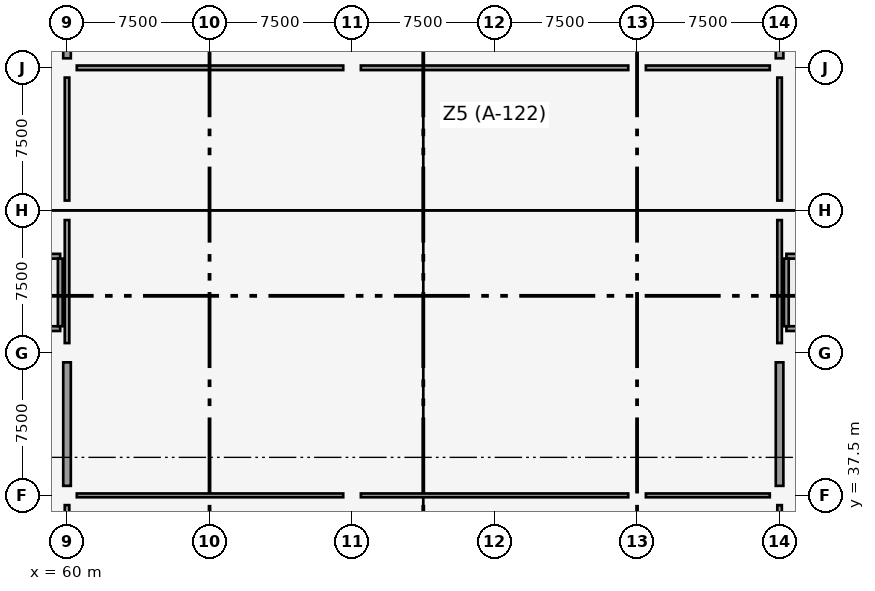
"""IFC4 building model, lengths in metres.
Left out: names, types, materials, properties, quantities, classifications, styles, units other than length and angle.
Written with IfcOpenShell. Run it as: python <this file> out.ifc"""

import sys

from ifc_helpers import new_model, si_unit, direction, frame, frame_2d, origin, origin_2d, place, context, subcontext, project, spatial, rectangle, extrude, element, fill, save


model = new_model("IFC4")
c1 = context("Model", 3, precision=1e-05, world=origin(), true_north=direction((0.0, 1.0)))
c2 = subcontext(c1, "Body", "Model", "MODEL_VIEW")
j1 = project(units=[si_unit("LENGTHUNIT", "METRE"), si_unit("PLANEANGLEUNIT", "RADIAN")], contexts=[c1])
p1 = place(None, origin())
s1 = spatial("IfcSite", under=j1, at=p1, CompositionType="ELEMENT")
p2 = place(p1, origin())
s2 = spatial("IfcBuilding", under=s1, at=p2, CompositionType="ELEMENT")
p3 = place(p2, origin())
s3 = spatial("IfcBuildingStorey", under=s2, at=p3, CompositionType="ELEMENT", Elevation=0.0)
for number, where, z_axis, x_axis in (
    (1, (60.0, 37.5, 0.0), (0.0, 0.0, 1.0), (1.0, 0.0, 0.0)),
    (2, (60.0, 45.0, 0.0), (0.0, 0.0, 1.0), (1.0, 0.0, 0.0)),
    (3, (60.0, 52.5, 0.0), (0.0, 0.0, 1.0), (1.0, 0.0, 0.0)),
    (4, (60.0, 60.0, 0.0), (0.0, 0.0, 1.0), (1.0, 0.0, 0.0)),
):
    element("IfcColumn", number, at=place(p3, frame(where, z_axis=z_axis, x_axis=x_axis)), inside=s3, PredefinedType="COLUMN", context=c2, shape_type="SweptSolid", body=[
        extrude(rectangle(XDim=1.0, YDim=1.0, at=origin_2d()), origin(), (0.0, 0.0, 1.0), 4.8),
    ])
for number, where, z_axis, x_axis in (
    (5, (75.0, 37.5, 0.0), (0.0, 0.0, 1.0), (1.0, 0.0, 0.0)),
    (6, (75.0, 45.0, 0.0), (0.0, 0.0, 1.0), (1.0, 0.0, 0.0)),
    (7, (75.0, 52.5, 0.0), (0.0, 0.0, 1.0), (1.0, 0.0, 0.0)),
    (8, (75.0, 60.0, 0.0), (0.0, 0.0, 1.0), (1.0, 0.0, 0.0)),
    (9, (90.0, 37.5, 0.0), (0.0, 0.0, 1.0), (1.0, 0.0, 0.0)),
    (10, (90.0, 45.0, 0.0), (0.0, 0.0, 1.0), (1.0, 0.0, 0.0)),
    (11, (90.0, 52.5, 0.0), (0.0, 0.0, 1.0), (1.0, 0.0, 0.0)),
    (12, (90.0, 60.0, 0.0), (0.0, 0.0, 1.0), (1.0, 0.0, 0.0)),
):
    element("IfcColumn", number, at=place(p3, frame(where, z_axis=z_axis, x_axis=x_axis)), inside=s3, PredefinedType="COLUMN", context=c2, shape_type="SweptSolid", body=[
        extrude(rectangle(XDim=0.9, YDim=0.9, at=origin_2d()), origin(), (0.0, 0.0, 1.0), 4.8),
    ])
for number, where, z_axis, x_axis in (
    (13, (97.5, 37.5, 0.0), (0.0, 0.0, 1.0), (1.0, 0.0, 0.0)),
    (14, (97.5, 45.0, 0.0), (0.0, 0.0, 1.0), (1.0, 0.0, 0.0)),
    (15, (97.5, 52.5, 0.0), (0.0, 0.0, 1.0), (1.0, 0.0, 0.0)),
    (16, (97.5, 60.0, 0.0), (0.0, 0.0, 1.0), (1.0, 0.0, 0.0)),
):
    element("IfcColumn", number, at=place(p3, frame(where, z_axis=z_axis, x_axis=x_axis)), inside=s3, PredefinedType="COLUMN", context=c2, shape_type="SweptSolid", body=[
        extrude(rectangle(XDim=1.0, YDim=1.0, at=origin_2d()), origin(), (0.0, 0.0, 1.0), 4.8),
    ])
for number, where, z_axis, x_axis in (
    (17, (60.0, 38.0, 0.0), (0.0, 0.0, 1.0), (0.0, 1.0, 0.0)),
    (18, (60.0, 60.5, 0.0), (0.0, 0.0, 1.0), (0.0, 1.0, 0.0)),
):
    element("IfcWall", number, at=place(p3, frame(where, z_axis=z_axis, x_axis=x_axis)), inside=s3, PredefinedType="SHEAR", context=c2, shape_type="SweptSolid", body=[
        extrude(rectangle(XDim=6.5, YDim=0.4, at=frame_2d((3.25, 0.0))), origin(), (0.0, 0.0, 1.0), 3.0),
    ])
for number, where, z_axis, x_axis in (
    (19, (97.5, 38.0, 0.0), (0.0, 0.0, 1.0), (0.0, 1.0, 0.0)),
    (20, (97.5, 60.5, 0.0), (0.0, 0.0, 1.0), (0.0, 1.0, 0.0)),
):
    element("IfcWall", number, at=place(p3, frame(where, z_axis=z_axis, x_axis=x_axis)), inside=s3, PredefinedType="SHEAR", context=c2, shape_type="SweptSolid", body=[
        extrude(rectangle(XDim=6.5, YDim=0.4, at=frame_2d((3.25, 0.0))), origin(), (0.0, 0.0, 1.0), 3.6),
    ])
p4 = place(p3, frame((52.38, 46.275, 0.0), z_axis=(0.0, 0.0, 1.0), x_axis=(1.0, 0.0, 0.0)))
e21 = element("IfcWall", 21, at=p4, inside=s3, PredefinedType="SOLIDWALL", context=c2, shape_type="SweptSolid", body=[
    extrude(rectangle(XDim=7.26, YDim=0.25, at=frame_2d((3.63, 0.0))), origin(), (0.0, 0.0, 1.0), 4.5),
])
p5 = place(p4, frame((0.62, 0.0, 0.0)))
e22 = element("IfcOpeningElement", 22, at=p5, cuts=e21, PredefinedType="OPENING", context=c2, shape_type="SweptSolid", body=[
    extrude(rectangle(XDim=1.1, YDim=2.15, at=frame_2d((0.55, 1.075))), frame((0.0, 0.135, 0.0), z_axis=(0.0, -1.0, 0.0), x_axis=(1.0, 0.0, 0.0)), (0.0, 0.0, 1.0), 0.27),
])
p6 = place(p3, frame((52.38, 50.085, 0.0), z_axis=(0.0, 0.0, 1.0), x_axis=(1.0, 0.0, 0.0)))
e23 = element("IfcWall", 23, at=p6, inside=s3, PredefinedType="SOLIDWALL", context=c2, shape_type="SweptSolid", body=[
    extrude(rectangle(XDim=7.26, YDim=0.25, at=frame_2d((3.63, 0.0))), origin(), (0.0, 0.0, 1.0), 4.5),
])
p7 = place(p6, frame((0.62, 0.0, 0.0)))
e24 = element("IfcOpeningElement", 24, at=p7, cuts=e23, PredefinedType="OPENING", context=c2, shape_type="SweptSolid", body=[
    extrude(rectangle(XDim=1.1, YDim=2.15, at=frame_2d((0.55, 1.075))), frame((0.0, 0.135, 0.0), z_axis=(0.0, -1.0, 0.0), x_axis=(1.0, 0.0, 0.0)), (0.0, 0.0, 1.0), 0.27),
])
p8 = place(p3, frame((59.645, 46.4, 0.0), z_axis=(0.0, 0.0, 1.0), x_axis=(0.0, 1.0, 0.0)))
e25 = element("IfcWall", 25, at=p8, inside=s3, PredefinedType="SOLIDWALL", context=c2, shape_type="SweptSolid", body=[
    extrude(rectangle(XDim=3.56, YDim=0.25, at=frame_2d((1.78, 0.0))), origin(), (0.0, 0.0, 1.0), 4.5),
])
p9 = place(p3, frame((97.86, 46.275, 0.0), z_axis=(0.0, 0.0, 1.0), x_axis=(1.0, 0.0, 0.0)))
e26 = element("IfcWall", 26, at=p9, inside=s3, PredefinedType="SOLIDWALL", context=c2, shape_type="SweptSolid", body=[
    extrude(rectangle(XDim=7.26, YDim=0.25, at=frame_2d((3.63, 0.0))), origin(), (0.0, 0.0, 1.0), 4.5),
])
p10 = place(p9, frame((5.54, 0.0, 0.0)))
e27 = element("IfcOpeningElement", 27, at=p10, cuts=e26, PredefinedType="OPENING", context=c2, shape_type="SweptSolid", body=[
    extrude(rectangle(XDim=1.1, YDim=2.15, at=frame_2d((0.55, 1.075))), frame((0.0, 0.135, 0.0), z_axis=(0.0, -1.0, 0.0), x_axis=(1.0, 0.0, 0.0)), (0.0, 0.0, 1.0), 0.27),
])
p11 = place(p3, frame((97.86, 50.085, 0.0), z_axis=(0.0, 0.0, 1.0), x_axis=(1.0, 0.0, 0.0)))
e28 = element("IfcWall", 28, at=p11, inside=s3, PredefinedType="SOLIDWALL", context=c2, shape_type="SweptSolid", body=[
    extrude(rectangle(XDim=7.26, YDim=0.25, at=frame_2d((3.63, 0.0))), origin(), (0.0, 0.0, 1.0), 4.5),
])
p12 = place(p11, frame((5.54, 0.0, 0.0)))
e29 = element("IfcOpeningElement", 29, at=p12, cuts=e28, PredefinedType="OPENING", context=c2, shape_type="SweptSolid", body=[
    extrude(rectangle(XDim=1.1, YDim=2.15, at=frame_2d((0.55, 1.075))), frame((0.0, 0.135, 0.0), z_axis=(0.0, -1.0, 0.0), x_axis=(1.0, 0.0, 0.0)), (0.0, 0.0, 1.0), 0.27),
])
p13 = place(p3, frame((97.855, 46.4, 0.0), z_axis=(0.0, 0.0, 1.0), x_axis=(0.0, 1.0, 0.0)))
e30 = element("IfcWall", 30, at=p13, inside=s3, PredefinedType="SOLIDWALL", context=c2, shape_type="SweptSolid", body=[
    extrude(rectangle(XDim=3.56, YDim=0.25, at=frame_2d((1.78, 0.0))), origin(), (0.0, 0.0, 1.0), 4.5),
])
p14 = place(p3, frame((60.514, 37.5, 0.0), z_axis=(0.0, 0.0, 1.0), x_axis=(1.0, 0.0, 0.0)))
e31 = element("IfcWall", 31, at=p14, inside=s3, PredefinedType="PARTITIONING", context=c2, shape_type="SweptSolid", body=[
    extrude(rectangle(XDim=14.022, YDim=0.2, at=frame_2d((7.011, 0.0))), origin(), (0.0, 0.0, 1.0), 2.97),
])
p15 = place(p14, frame((2.336, 0.0, 0.0)))
e32 = element("IfcOpeningElement", 32, at=p15, cuts=e31, PredefinedType="OPENING", context=c2, shape_type="SweptSolid", body=[
    extrude(rectangle(XDim=1.8, YDim=2.18, at=frame_2d((0.9, 1.09))), frame((0.0, 0.11, 0.0), z_axis=(0.0, -1.0, 0.0), x_axis=(1.0, 0.0, 0.0)), (0.0, 0.0, 1.0), 0.22),
])
p16 = place(p3, frame((75.464, 37.5, 0.0), z_axis=(0.0, 0.0, 1.0), x_axis=(1.0, 0.0, 0.0)))
e33 = element("IfcWall", 33, at=p16, inside=s3, PredefinedType="PARTITIONING", context=c2, shape_type="SweptSolid", body=[
    extrude(rectangle(XDim=14.072, YDim=0.2, at=frame_2d((7.036, 0.0))), origin(), (0.0, 0.0, 1.0), 2.97),
])
p17 = place(p3, frame((90.464, 37.5, 0.0), z_axis=(0.0, 0.0, 1.0), x_axis=(1.0, 0.0, 0.0)))
e34 = element("IfcWall", 34, at=p17, inside=s3, PredefinedType="PARTITIONING", context=c2, shape_type="SweptSolid", body=[
    extrude(rectangle(XDim=6.522, YDim=0.2, at=frame_2d((3.261, 0.0))), origin(), (0.0, 0.0, 1.0), 2.97),
])
p18 = place(p17, frame((2.386, 0.0, 0.0)))
e35 = element("IfcOpeningElement", 35, at=p18, cuts=e34, PredefinedType="OPENING", context=c2, shape_type="SweptSolid", body=[
    extrude(rectangle(XDim=1.8, YDim=2.18, at=frame_2d((0.9, 1.09))), frame((0.0, 0.11, 0.0), z_axis=(0.0, -1.0, 0.0), x_axis=(1.0, 0.0, 0.0)), (0.0, 0.0, 1.0), 0.22),
])
p19 = place(p3, frame((60.514, 60.0, 0.0), z_axis=(0.0, 0.0, 1.0), x_axis=(1.0, 0.0, 0.0)))
e36 = element("IfcWall", 36, at=p19, inside=s3, PredefinedType="PARTITIONING", context=c2, shape_type="SweptSolid", body=[
    extrude(rectangle(XDim=14.022, YDim=0.24, at=frame_2d((7.011, 0.0))), origin(), (0.0, 0.0, 1.0), 2.97),
])
p20 = place(p19, frame((2.436, 0.0, 0.0)))
e37 = element("IfcOpeningElement", 37, at=p20, cuts=e36, PredefinedType="OPENING", context=c2, shape_type="SweptSolid", body=[
    extrude(rectangle(XDim=1.6, YDim=2.15, at=frame_2d((0.8, 1.075))), frame((0.0, 0.13, 0.0), z_axis=(0.0, -1.0, 0.0), x_axis=(1.0, 0.0, 0.0)), (0.0, 0.0, 1.0), 0.26),
])
p21 = place(p3, frame((75.464, 60.0, 0.0), z_axis=(0.0, 0.0, 1.0), x_axis=(1.0, 0.0, 0.0)))
e38 = element("IfcWall", 38, at=p21, inside=s3, PredefinedType="PARTITIONING", context=c2, shape_type="SweptSolid", body=[
    extrude(rectangle(XDim=14.072, YDim=0.24, at=frame_2d((7.036, 0.0))), origin(), (0.0, 0.0, 1.0), 2.97),
])
p22 = place(p3, frame((90.464, 60.0, 0.0), z_axis=(0.0, 0.0, 1.0), x_axis=(1.0, 0.0, 0.0)))
e39 = element("IfcWall", 39, at=p22, inside=s3, PredefinedType="PARTITIONING", context=c2, shape_type="SweptSolid", body=[
    extrude(rectangle(XDim=6.522, YDim=0.24, at=frame_2d((3.261, 0.0))), origin(), (0.0, 0.0, 1.0), 2.97),
])
p23 = place(p22, frame((2.486, 0.0, 0.0)))
e40 = element("IfcOpeningElement", 40, at=p23, cuts=e39, PredefinedType="OPENING", context=c2, shape_type="SweptSolid", body=[
    extrude(rectangle(XDim=1.6, YDim=2.15, at=frame_2d((0.8, 1.075))), frame((0.0, 0.13, 0.0), z_axis=(0.0, -1.0, 0.0), x_axis=(1.0, 0.0, 0.0)), (0.0, 0.0, 1.0), 0.26),
])
p24 = place(p3, frame((60.0, 30.514, 0.0), z_axis=(0.0, 0.0, 1.0), x_axis=(0.0, 1.0, 0.0)))
e41 = element("IfcWall", 41, at=p24, inside=s3, PredefinedType="PARTITIONING", context=c2, shape_type="SweptSolid", body=[
    extrude(rectangle(XDim=6.472, YDim=0.24, at=frame_2d((3.236, 0.0))), origin(), (0.0, 0.0, 1.0), 2.97),
])
p25 = place(p24, frame((2.336, 0.0, 0.0)))
e42 = element("IfcOpeningElement", 42, at=p25, cuts=e41, PredefinedType="OPENING", context=c2, shape_type="SweptSolid", body=[
    extrude(rectangle(XDim=1.8, YDim=2.16, at=frame_2d((0.9, 1.08))), frame((0.0, 0.13, 0.0), z_axis=(0.0, -1.0, 0.0), x_axis=(1.0, 0.0, 0.0)), (0.0, 0.0, 1.0), 0.26),
])
p26 = place(p3, frame((60.0, 45.514, 0.0), z_axis=(0.0, 0.0, 1.0), x_axis=(0.0, 1.0, 0.0)))
e43 = element("IfcWall", 43, at=p26, inside=s3, PredefinedType="PARTITIONING", context=c2, shape_type="SweptSolid", body=[
    extrude(rectangle(XDim=6.472, YDim=0.24, at=frame_2d((3.236, 0.0))), origin(), (0.0, 0.0, 1.0), 2.97),
])
p27 = place(p3, frame((60.0, 53.014, 0.0), z_axis=(0.0, 0.0, 1.0), x_axis=(0.0, 1.0, 0.0)))
e44 = element("IfcWall", 44, at=p27, inside=s3, PredefinedType="PARTITIONING", context=c2, shape_type="SweptSolid", body=[
    extrude(rectangle(XDim=6.472, YDim=0.24, at=frame_2d((3.236, 0.0))), origin(), (0.0, 0.0, 1.0), 2.97),
])
p28 = place(p27, frame((2.436, 0.0, 0.0)))
e45 = element("IfcOpeningElement", 45, at=p28, cuts=e44, PredefinedType="OPENING", context=c2, shape_type="SweptSolid", body=[
    extrude(rectangle(XDim=1.6, YDim=2.15, at=frame_2d((0.8, 1.075))), frame((0.0, 0.13, 0.0), z_axis=(0.0, -1.0, 0.0), x_axis=(1.0, 0.0, 0.0)), (0.0, 0.0, 1.0), 0.26),
])
p29 = place(p3, frame((97.5, 30.514, 0.0), z_axis=(0.0, 0.0, 1.0), x_axis=(0.0, 1.0, 0.0)))
e46 = element("IfcWall", 46, at=p29, inside=s3, PredefinedType="PARTITIONING", context=c2, shape_type="SweptSolid", body=[
    extrude(rectangle(XDim=6.472, YDim=0.24, at=frame_2d((3.236, 0.0))), origin(), (0.0, 0.0, 1.0), 3.57),
])
p30 = place(p29, frame((2.336, 0.0, 0.0)))
e47 = element("IfcOpeningElement", 47, at=p30, cuts=e46, PredefinedType="OPENING", context=c2, shape_type="SweptSolid", body=[
    extrude(rectangle(XDim=1.8, YDim=2.16, at=frame_2d((0.9, 1.08))), frame((0.0, 0.13, 0.0), z_axis=(0.0, -1.0, 0.0), x_axis=(1.0, 0.0, 0.0)), (0.0, 0.0, 1.0), 0.26),
])
p31 = place(p3, frame((97.5, 45.514, 0.0), z_axis=(0.0, 0.0, 1.0), x_axis=(0.0, 1.0, 0.0)))
e48 = element("IfcWall", 48, at=p31, inside=s3, PredefinedType="PARTITIONING", context=c2, shape_type="SweptSolid", body=[
    extrude(rectangle(XDim=6.472, YDim=0.24, at=frame_2d((3.236, 0.0))), origin(), (0.0, 0.0, 1.0), 3.57),
])
p32 = place(p3, frame((97.5, 53.014, 0.0), z_axis=(0.0, 0.0, 1.0), x_axis=(0.0, 1.0, 0.0)))
e49 = element("IfcWall", 49, at=p32, inside=s3, PredefinedType="PARTITIONING", context=c2, shape_type="SweptSolid", body=[
    extrude(rectangle(XDim=6.472, YDim=0.24, at=frame_2d((3.236, 0.0))), origin(), (0.0, 0.0, 1.0), 3.57),
])
p33 = place(p32, frame((2.436, 0.0, 0.0)))
e50 = element("IfcOpeningElement", 50, at=p33, cuts=e49, PredefinedType="OPENING", context=c2, shape_type="SweptSolid", body=[
    extrude(rectangle(XDim=1.6, YDim=2.15, at=frame_2d((0.8, 1.075))), frame((0.0, 0.13, 0.0), z_axis=(0.0, -1.0, 0.0), x_axis=(1.0, 0.0, 0.0)), (0.0, 0.0, 1.0), 0.26),
])
p34 = place(p15, origin())
e51 = element("IfcDoor", 51, at=p34, inside=s3, OperationType="SINGLE_SWING_RIGHT", PredefinedType="DOOR", context=c2, shape_type="SweptSolid", body=[
    extrude(rectangle(XDim=1.8, YDim=2.18, at=frame_2d((0.9, 1.09))), frame((0.0, 0.025, 0.0), z_axis=(0.0, -1.0, 0.0), x_axis=(1.0, 0.0, 0.0)), (0.0, 0.0, 1.0), 0.05),
])
fill(e32, e51)
p35 = place(p18, origin())
e52 = element("IfcDoor", 52, at=p35, inside=s3, OperationType="SINGLE_SWING_LEFT", PredefinedType="DOOR", context=c2, shape_type="SweptSolid", body=[
    extrude(rectangle(XDim=1.8, YDim=2.18, at=frame_2d((0.9, 1.09))), frame((0.0, 0.025, 0.0), z_axis=(0.0, -1.0, 0.0), x_axis=(1.0, 0.0, 0.0)), (0.0, 0.0, 1.0), 0.05),
])
fill(e35, e52)
p36 = place(p20, origin())
e53 = element("IfcDoor", 53, at=p36, inside=s3, OperationType="SINGLE_SWING_RIGHT", PredefinedType="DOOR", context=c2, shape_type="SweptSolid", body=[
    extrude(rectangle(XDim=1.6, YDim=2.15, at=frame_2d((0.8, 1.075))), frame((0.0, 0.025, 0.0), z_axis=(0.0, -1.0, 0.0), x_axis=(1.0, 0.0, 0.0)), (0.0, 0.0, 1.0), 0.05),
])
fill(e37, e53)
p37 = place(p23, origin())
e54 = element("IfcDoor", 54, at=p37, inside=s3, OperationType="SINGLE_SWING_LEFT", PredefinedType="DOOR", context=c2, shape_type="SweptSolid", body=[
    extrude(rectangle(XDim=1.6, YDim=2.15, at=frame_2d((0.8, 1.075))), frame((0.0, 0.025, 0.0), z_axis=(0.0, -1.0, 0.0), x_axis=(1.0, 0.0, 0.0)), (0.0, 0.0, 1.0), 0.05),
])
fill(e40, e54)
p38 = place(p28, origin())
e55 = element("IfcDoor", 55, at=p38, inside=s3, OperationType="SINGLE_SWING_RIGHT", PredefinedType="DOOR", context=c2, shape_type="SweptSolid", body=[
    extrude(rectangle(XDim=1.6, YDim=2.15, at=frame_2d((0.8, 1.075))), frame((0.0, 0.025, 0.0), z_axis=(0.0, -1.0, 0.0), x_axis=(1.0, 0.0, 0.0)), (0.0, 0.0, 1.0), 0.05),
])
fill(e45, e55)
p39 = place(p33, origin())
e56 = element("IfcDoor", 56, at=p39, inside=s3, OperationType="SINGLE_SWING_RIGHT", PredefinedType="DOOR", context=c2, shape_type="SweptSolid", body=[
    extrude(rectangle(XDim=1.6, YDim=2.15, at=frame_2d((0.8, 1.075))), frame((0.0, 0.025, 0.0), z_axis=(0.0, -1.0, 0.0), x_axis=(1.0, 0.0, 0.0)), (0.0, 0.0, 1.0), 0.05),
])
fill(e50, e56)
save(model, sys.argv[1])
